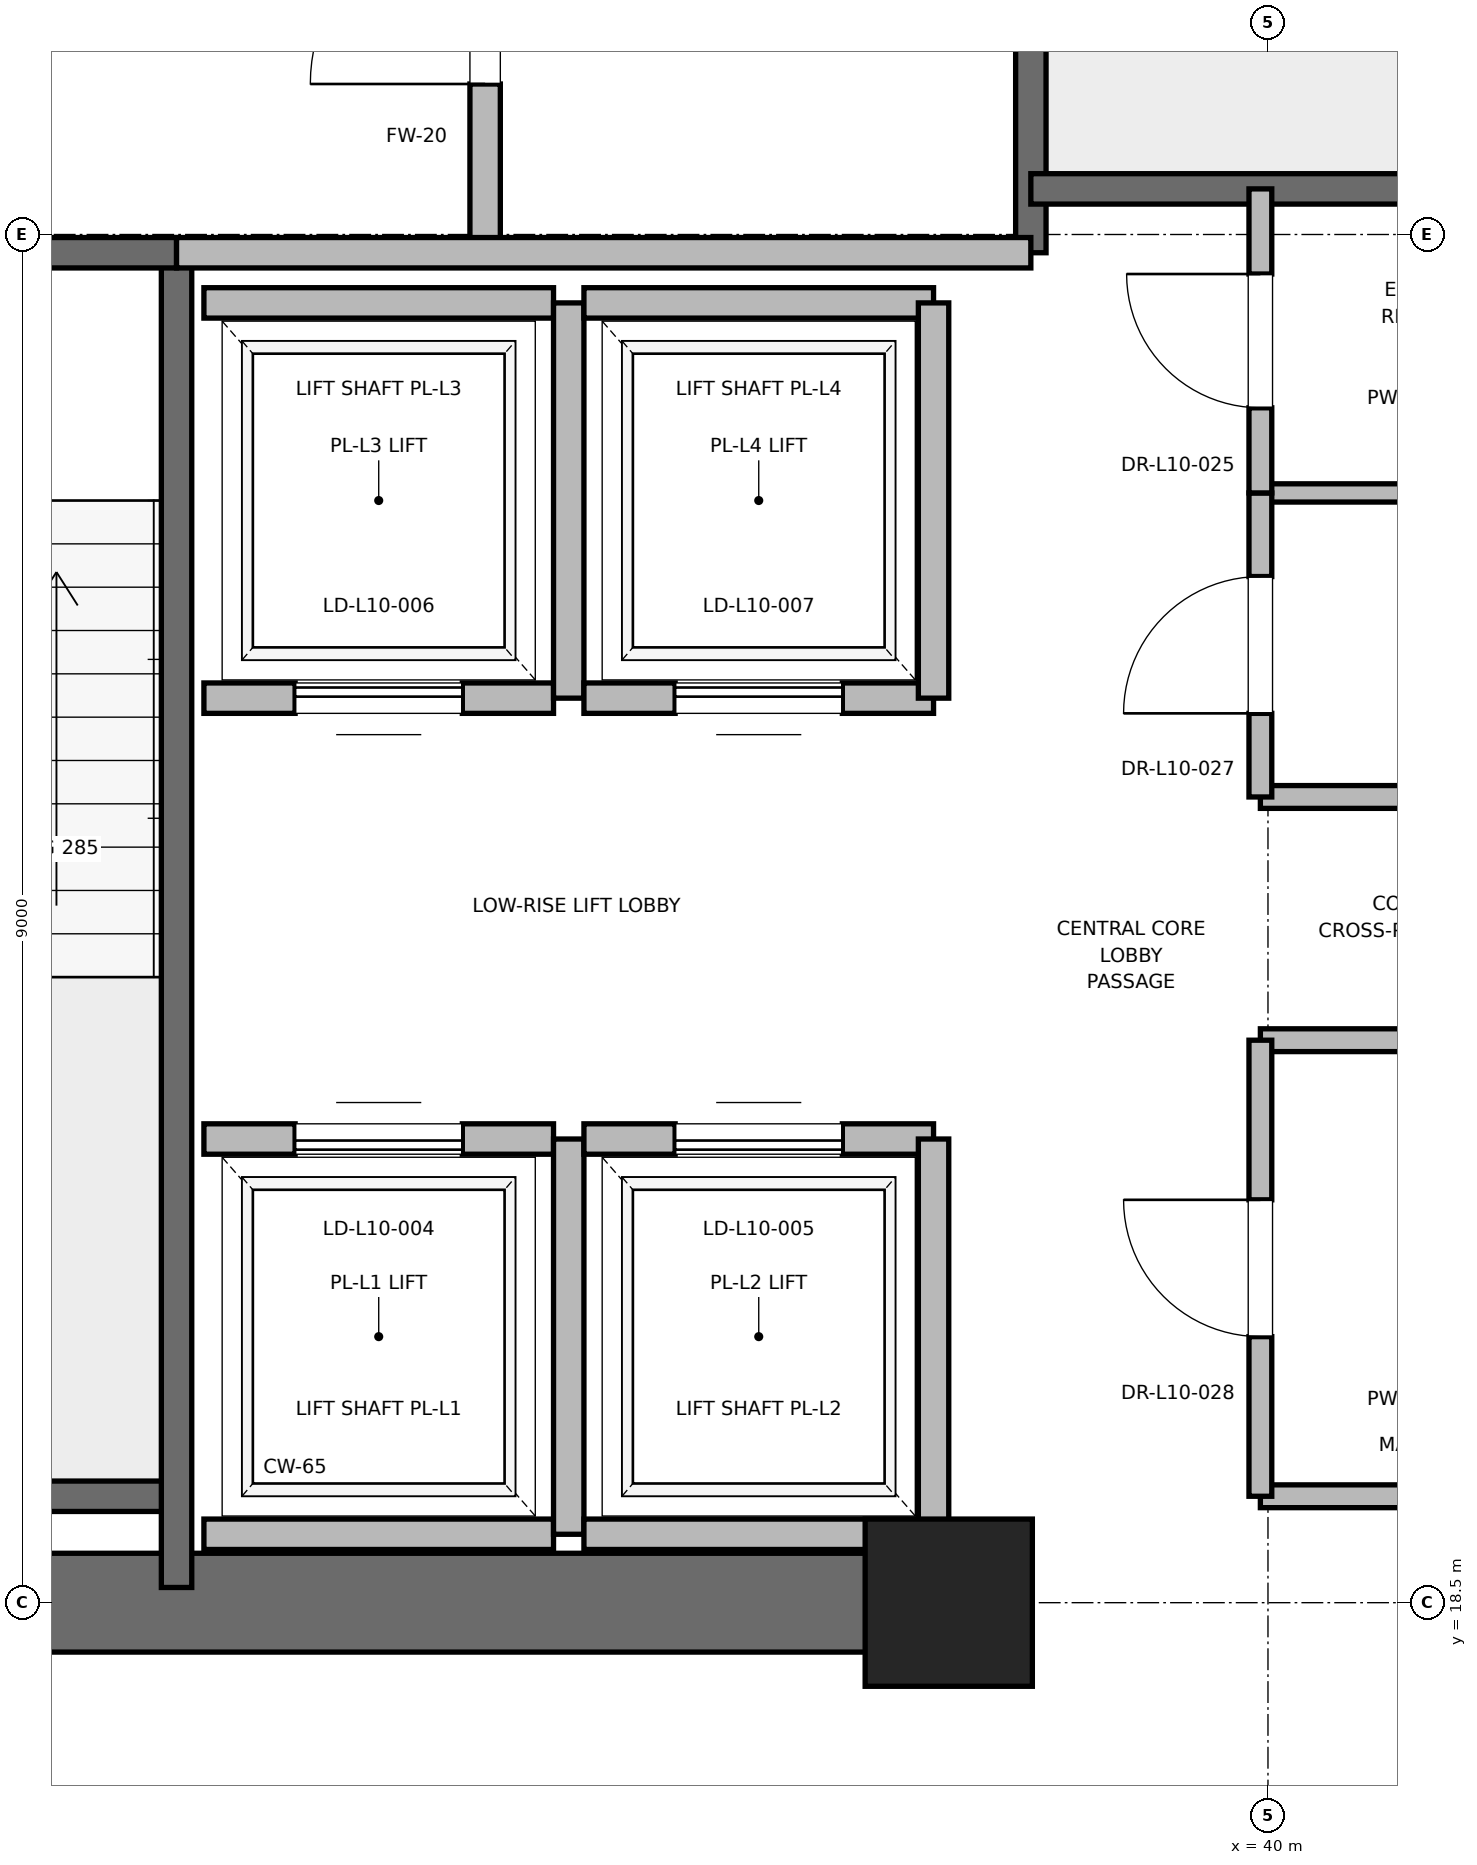
"""IFC4 building model, lengths in metres.
Left out: names, types, materials, properties, quantities, classifications, styles, units other than length and angle.
Written with IfcOpenShell. Run it as: python <this file> out.ifc"""

import sys

from ifc_helpers import new_model, si_unit, direction, frame, frame_2d, origin, origin_2d, place, context, subcontext, project, spatial, rectangle, extrude, element, fill, save


model = new_model("IFC4")
c1 = context("Model", 3, precision=1e-05, world=origin(), true_north=direction((0.0, 1.0)))
c2 = subcontext(c1, "Body", "Model", "MODEL_VIEW")
j1 = project(units=[si_unit("LENGTHUNIT", "METRE"), si_unit("PLANEANGLEUNIT", "RADIAN")], contexts=[c1])
p1 = place(None, origin())
s1 = spatial("IfcSite", under=j1, at=p1, CompositionType="ELEMENT")
p2 = place(p1, origin())
s2 = spatial("IfcBuilding", under=s1, at=p2, CompositionType="ELEMENT")
p3 = place(p2, frame((0.0, 0.0, 47.6)))
s3 = spatial("IfcBuildingStorey", under=s2, at=p3, CompositionType="ELEMENT", Elevation=47.6)
p4 = place(p3, frame((37.9, 18.5, 0.0), z_axis=(0.0, 0.0, 1.0), x_axis=(1.0, 0.0, 0.0)))
e1 = element("IfcColumn", 1, at=p4, inside=s3, PredefinedType="PILASTER", context=c2, shape_type="SweptSolid", body=[
    extrude(rectangle(XDim=1.1, YDim=1.1, at=origin_2d()), origin(), (0.0, 0.0, 1.0), 4.0),
])
p5 = place(p3, frame((29.0, 18.5, 0.0), z_axis=(0.0, 0.0, 1.0), x_axis=(1.0, 0.0, 0.0)))
e2 = element("IfcWall", 2, at=p5, inside=s3, PredefinedType="SHEAR", context=c2, shape_type="SweptSolid", body=[
    extrude(rectangle(XDim=9.2, YDim=0.65, at=frame_2d((4.6, 0.0))), origin(), (0.0, 0.0, 1.0), 3.76),
])
p6 = place(p3, frame((29.7, 19.2, 0.0), z_axis=(0.0, 0.0, 1.0), x_axis=(1.0, 0.0, 0.0)))
e3 = element("IfcWall", 3, at=p6, inside=s3, PredefinedType="SOLIDWALL", context=c2, shape_type="SweptSolid", body=[
    extrude(rectangle(XDim=3.12, YDim=0.2, at=frame_2d((1.56, 0.0))), origin(), (0.0, 0.0, 1.0), 3.76),
])
p7 = place(p3, frame((32.82, 18.6, 0.0), z_axis=(0.0, 0.0, 1.0), x_axis=(0.0, 1.0, 0.0)))
e4 = element("IfcWall", 4, at=p7, inside=s3, PredefinedType="SOLIDWALL", context=c2, shape_type="SweptSolid", body=[
    extrude(rectangle(XDim=8.78, YDim=0.2, at=frame_2d((4.39, 0.0))), origin(), (0.0, 0.0, 1.0), 3.76),
])
p8 = place(p3, frame((29.7, 27.38, 0.0), z_axis=(0.0, 0.0, 1.0), x_axis=(1.0, 0.0, 0.0)))
e5 = element("IfcWall", 5, at=p8, inside=s3, PredefinedType="SOLIDWALL", context=c2, shape_type="SweptSolid", body=[
    extrude(rectangle(XDim=3.12, YDim=0.2, at=frame_2d((1.56, 0.0))), origin(), (0.0, 0.0, 1.0), 3.76),
])
p9 = place(p8, frame((1.01, 0.0, 0.0)))
e6 = element("IfcOpeningElement", 6, at=p9, cuts=e5, PredefinedType="OPENING", context=c2, shape_type="SweptSolid", body=[
    extrude(rectangle(XDim=1.1, YDim=2.15, at=frame_2d((0.55, 1.075))), frame((0.0, 0.1, 0.0), z_axis=(0.0, -1.0, 0.0), x_axis=(1.0, 0.0, 0.0)), (0.0, 0.0, 1.0), 0.2),
])
p10 = place(p3, frame((38.44, 27.38, 0.0), z_axis=(0.0, 0.0, 1.0), x_axis=(0.0, 1.0, 0.0)))
e7 = element("IfcWall", 7, at=p10, inside=s3, PredefinedType="SOLIDWALL", context=c2, shape_type="SweptSolid", body=[
    extrude(rectangle(XDim=8.87, YDim=0.2, at=frame_2d((4.435, 0.0))), origin(), (0.0, 0.0, 1.0), 3.76),
])
p11 = place(p3, frame((38.44, 27.8, 0.0), z_axis=(0.0, 0.0, 1.0), x_axis=(1.0, 0.0, 0.0)))
e8 = element("IfcWall", 8, at=p11, inside=s3, PredefinedType="SOLIDWALL", context=c2, shape_type="SweptSolid", body=[
    extrude(rectangle(XDim=3.32, YDim=0.2, at=frame_2d((1.66, 0.0))), origin(), (0.0, 0.0, 1.0), 3.76),
])
p12 = place(p3, frame((34.85, 27.38, 0.0), z_axis=(0.0, 0.0, 1.0), x_axis=(0.0, 1.0, 0.0)))
e9 = element("IfcWall", 9, at=p12, inside=s3, PredefinedType="PARTITIONING", context=c2, shape_type="SweptSolid", body=[
    extrude(rectangle(XDim=3.37, YDim=0.2, at=frame_2d((1.685, 0.0))), origin(), (0.0, 0.0, 1.0), 3.76),
])
p13 = place(p12, frame((1.11, 0.0, 0.0)))
e10 = element("IfcOpeningElement", 10, at=p13, cuts=e9, PredefinedType="OPENING", context=c2, shape_type="SweptSolid", body=[
    extrude(rectangle(XDim=1.15, YDim=2.2, at=frame_2d((0.575, 1.1))), frame((0.0, 0.1, 0.0), z_axis=(0.0, -1.0, 0.0), x_axis=(1.0, 0.0, 0.0)), (0.0, 0.0, 1.0), 0.2),
])
p14 = place(p3, frame((32.82, 27.38, 0.0), z_axis=(0.0, 0.0, 1.0), x_axis=(1.0, 0.0, 0.0)))
e11 = element("IfcWall", 11, at=p14, inside=s3, PredefinedType="PARTITIONING", context=c2, shape_type="SweptSolid", body=[
    extrude(rectangle(XDim=5.62, YDim=0.2, at=frame_2d((2.81, 0.0))), origin(), (0.0, 0.0, 1.0), 3.76),
])
p15 = place(p3, frame((33.0, 18.95, 0.0), z_axis=(0.0, 0.0, 1.0), x_axis=(1.0, 0.0, 0.0)))
e12 = element("IfcWall", 12, at=p15, inside=s3, PredefinedType="SOLIDWALL", context=c2, shape_type="SweptSolid", body=[
    extrude(rectangle(XDim=2.3, YDim=0.2, at=frame_2d((1.15, 0.0))), origin(), (0.0, 0.0, 1.0), 3.76),
])
p16 = place(p3, frame((35.3, 21.55, 0.0), z_axis=(0.0, 0.0, 1.0), x_axis=(-1.0, 0.0, 0.0)))
e13 = element("IfcWall", 13, at=p16, inside=s3, PredefinedType="SOLIDWALL", context=c2, shape_type="SweptSolid", body=[
    extrude(rectangle(XDim=2.3, YDim=0.2, at=frame_2d((1.15, 0.0))), origin(), (0.0, 0.0, 1.0), 3.76),
])
p17 = place(p16, frame((0.6, 0.0, 0.0)))
e14 = element("IfcOpeningElement", 14, at=p17, cuts=e13, PredefinedType="OPENING", context=c2, shape_type="SweptSolid", body=[
    extrude(rectangle(XDim=1.1, YDim=2.2, at=frame_2d((0.55, 1.1))), frame((0.0, 0.1, 0.0), z_axis=(0.0, -1.0, 0.0), x_axis=(1.0, 0.0, 0.0)), (0.0, 0.0, 1.0), 0.2),
])
p18 = place(p3, frame((35.4, 18.95, 0.0), z_axis=(0.0, 0.0, 1.0), x_axis=(0.0, 1.0, 0.0)))
e15 = element("IfcWall", 15, at=p18, inside=s3, PredefinedType="SOLIDWALL", context=c2, shape_type="SweptSolid", body=[
    extrude(rectangle(XDim=2.6, YDim=0.2, at=frame_2d((1.3, 0.0))), origin(), (0.0, 0.0, 1.0), 3.76),
])
p19 = place(p3, frame((35.5, 18.95, 0.0), z_axis=(0.0, 0.0, 1.0), x_axis=(1.0, 0.0, 0.0)))
e16 = element("IfcWall", 16, at=p19, inside=s3, PredefinedType="SOLIDWALL", context=c2, shape_type="SweptSolid", body=[
    extrude(rectangle(XDim=2.3, YDim=0.2, at=frame_2d((1.15, 0.0))), origin(), (0.0, 0.0, 1.0), 2.54),
])
p20 = place(p3, frame((37.8, 21.55, 0.0), z_axis=(0.0, 0.0, 1.0), x_axis=(-1.0, 0.0, 0.0)))
e17 = element("IfcWall", 17, at=p20, inside=s3, PredefinedType="SOLIDWALL", context=c2, shape_type="SweptSolid", body=[
    extrude(rectangle(XDim=2.3, YDim=0.2, at=frame_2d((1.15, 0.0))), origin(), (0.0, 0.0, 1.0), 3.76),
])
p21 = place(p20, frame((0.6, 0.0, 0.0)))
e18 = element("IfcOpeningElement", 18, at=p21, cuts=e17, PredefinedType="OPENING", context=c2, shape_type="SweptSolid", body=[
    extrude(rectangle(XDim=1.1, YDim=2.2, at=frame_2d((0.55, 1.1))), frame((0.0, 0.1, 0.0), z_axis=(0.0, -1.0, 0.0), x_axis=(1.0, 0.0, 0.0)), (0.0, 0.0, 1.0), 0.2),
])
p22 = place(p3, frame((37.8, 18.95, 0.0), z_axis=(0.0, 0.0, 1.0), x_axis=(0.0, 1.0, 0.0)))
e19 = element("IfcWall", 19, at=p22, inside=s3, PredefinedType="SOLIDWALL", context=c2, shape_type="SweptSolid", body=[
    extrude(rectangle(XDim=2.6, YDim=0.2, at=frame_2d((1.3, 0.0))), origin(), (0.0, 0.0, 1.0), 2.54),
])
p23 = place(p3, frame((33.0, 24.45, 0.0), z_axis=(0.0, 0.0, 1.0), x_axis=(1.0, 0.0, 0.0)))
e20 = element("IfcWall", 20, at=p23, inside=s3, PredefinedType="SOLIDWALL", context=c2, shape_type="SweptSolid", body=[
    extrude(rectangle(XDim=2.3, YDim=0.2, at=frame_2d((1.15, 0.0))), origin(), (0.0, 0.0, 1.0), 3.76),
])
p24 = place(p23, frame((0.6, 0.0, 0.0)))
e21 = element("IfcOpeningElement", 21, at=p24, cuts=e20, PredefinedType="OPENING", context=c2, shape_type="SweptSolid", body=[
    extrude(rectangle(XDim=1.1, YDim=2.2, at=frame_2d((0.55, 1.1))), frame((0.0, 0.1, 0.0), z_axis=(0.0, -1.0, 0.0), x_axis=(1.0, 0.0, 0.0)), (0.0, 0.0, 1.0), 0.2),
])
p25 = place(p3, frame((35.3, 27.05, 0.0), z_axis=(0.0, 0.0, 1.0), x_axis=(-1.0, 0.0, 0.0)))
e22 = element("IfcWall", 22, at=p25, inside=s3, PredefinedType="SOLIDWALL", context=c2, shape_type="SweptSolid", body=[
    extrude(rectangle(XDim=2.3, YDim=0.2, at=frame_2d((1.15, 0.0))), origin(), (0.0, 0.0, 1.0), 3.76),
])
p26 = place(p3, frame((35.4, 24.45, 0.0), z_axis=(0.0, 0.0, 1.0), x_axis=(0.0, 1.0, 0.0)))
e23 = element("IfcWall", 23, at=p26, inside=s3, PredefinedType="SOLIDWALL", context=c2, shape_type="SweptSolid", body=[
    extrude(rectangle(XDim=2.6, YDim=0.2, at=frame_2d((1.3, 0.0))), origin(), (0.0, 0.0, 1.0), 3.76),
])
p27 = place(p3, frame((35.5, 24.45, 0.0), z_axis=(0.0, 0.0, 1.0), x_axis=(1.0, 0.0, 0.0)))
e24 = element("IfcWall", 24, at=p27, inside=s3, PredefinedType="SOLIDWALL", context=c2, shape_type="SweptSolid", body=[
    extrude(rectangle(XDim=2.3, YDim=0.2, at=frame_2d((1.15, 0.0))), origin(), (0.0, 0.0, 1.0), 3.76),
])
p28 = place(p27, frame((0.6, 0.0, 0.0)))
e25 = element("IfcOpeningElement", 25, at=p28, cuts=e24, PredefinedType="OPENING", context=c2, shape_type="SweptSolid", body=[
    extrude(rectangle(XDim=1.1, YDim=2.2, at=frame_2d((0.55, 1.1))), frame((0.0, 0.1, 0.0), z_axis=(0.0, -1.0, 0.0), x_axis=(1.0, 0.0, 0.0)), (0.0, 0.0, 1.0), 0.2),
])
p29 = place(p3, frame((37.8, 27.05, 0.0), z_axis=(0.0, 0.0, 1.0), x_axis=(-1.0, 0.0, 0.0)))
e26 = element("IfcWall", 26, at=p29, inside=s3, PredefinedType="SOLIDWALL", context=c2, shape_type="SweptSolid", body=[
    extrude(rectangle(XDim=2.3, YDim=0.2, at=frame_2d((1.15, 0.0))), origin(), (0.0, 0.0, 1.0), 3.76),
])
p30 = place(p3, frame((37.8, 24.45, 0.0), z_axis=(0.0, 0.0, 1.0), x_axis=(0.0, 1.0, 0.0)))
e27 = element("IfcWall", 27, at=p30, inside=s3, PredefinedType="SOLIDWALL", context=c2, shape_type="SweptSolid", body=[
    extrude(rectangle(XDim=2.6, YDim=0.2, at=frame_2d((1.3, 0.0))), origin(), (0.0, 0.0, 1.0), 3.76),
])
for number, where, z_axis, x_axis in (
    (28, (39.95, 19.2, 0.0), (0.0, 0.0, 1.0), (1.0, 0.0, 0.0)),
    (29, (39.95, 22.2, 0.0), (0.0, 0.0, 1.0), (1.0, 0.0, 0.0)),
    (30, (39.95, 23.8, 0.0), (0.0, 0.0, 1.0), (1.0, 0.0, 0.0)),
):
    element("IfcWall", number, at=place(p3, frame(where, z_axis=z_axis, x_axis=x_axis)), inside=s3, PredefinedType="PARTITIONING", context=c2, shape_type="SweptSolid", body=[
        extrude(rectangle(XDim=1.81, YDim=0.15, at=frame_2d((0.905, 0.0))), origin(), (0.0, 0.0, 1.0), 2.85),
    ])
p31 = place(p3, frame((39.95, 25.8, 0.0), z_axis=(0.0, 0.0, 1.0), x_axis=(1.0, 0.0, 0.0)))
e31 = element("IfcWall", 31, at=p31, inside=s3, PredefinedType="PARTITIONING", context=c2, shape_type="SweptSolid", body=[
    extrude(rectangle(XDim=1.81, YDim=0.12, at=frame_2d((0.905, 0.0))), origin(), (0.0, 0.0, 1.0), 2.85),
])
p32 = place(p3, frame((39.95, 19.2, 0.0), z_axis=(0.0, 0.0, 1.0), x_axis=(0.0, 1.0, 0.0)))
e32 = element("IfcWall", 32, at=p32, inside=s3, PredefinedType="PARTITIONING", context=c2, shape_type="SweptSolid", body=[
    extrude(rectangle(XDim=3.0, YDim=0.15, at=frame_2d((1.5, 0.0))), origin(), (0.0, 0.0, 1.0), 2.85),
])
p33 = place(p32, frame((1.05, 0.0, 0.0)))
e33 = element("IfcOpeningElement", 33, at=p33, cuts=e32, PredefinedType="OPENING", context=c2, shape_type="SweptSolid", body=[
    extrude(rectangle(XDim=0.9, YDim=2.1, at=frame_2d((0.45, 1.05))), frame((0.0, 0.075, 0.0), z_axis=(0.0, -1.0, 0.0), x_axis=(1.0, 0.0, 0.0)), (0.0, 0.0, 1.0), 0.15),
])
p34 = place(p3, frame((39.95, 23.8, 0.0), z_axis=(0.0, 0.0, 1.0), x_axis=(0.0, 1.0, 0.0)))
e34 = element("IfcWall", 34, at=p34, inside=s3, PredefinedType="PARTITIONING", context=c2, shape_type="SweptSolid", body=[
    extrude(rectangle(XDim=2.0, YDim=0.15, at=frame_2d((1.0, 0.0))), origin(), (0.0, 0.0, 1.0), 2.85),
])
p35 = place(p34, frame((0.55, 0.0, 0.0)))
e35 = element("IfcOpeningElement", 35, at=p35, cuts=e34, PredefinedType="OPENING", context=c2, shape_type="SweptSolid", body=[
    extrude(rectangle(XDim=0.9, YDim=2.1, at=frame_2d((0.45, 1.05))), frame((0.0, 0.075, 0.0), z_axis=(0.0, -1.0, 0.0), x_axis=(1.0, 0.0, 0.0)), (0.0, 0.0, 1.0), 0.15),
])
p36 = place(p3, frame((39.95, 25.8, 0.0), z_axis=(0.0, 0.0, 1.0), x_axis=(0.0, 1.0, 0.0)))
e36 = element("IfcWall", 36, at=p36, inside=s3, PredefinedType="PARTITIONING", context=c2, shape_type="SweptSolid", body=[
    extrude(rectangle(XDim=2.0, YDim=0.15, at=frame_2d((1.0, 0.0))), origin(), (0.0, 0.0, 1.0), 2.85),
])
p37 = place(p36, frame((0.56, 0.0, 0.0)))
e37 = element("IfcOpeningElement", 37, at=p37, cuts=e36, PredefinedType="OPENING", context=c2, shape_type="SweptSolid", body=[
    extrude(rectangle(XDim=0.88, YDim=2.1, at=frame_2d((0.44, 1.05))), frame((0.0, 0.075, 0.0), z_axis=(0.0, -1.0, 0.0), x_axis=(1.0, 0.0, 0.0)), (0.0, 0.0, 1.0), 0.15),
])
p38 = place(p13, origin())
e38 = element("IfcDoor", 38, at=p38, inside=s3, OperationType="SINGLE_SWING_LEFT", PredefinedType="DOOR", context=c2, shape_type="SweptSolid", body=[
    extrude(rectangle(XDim=1.15, YDim=2.2, at=frame_2d((0.575, 1.1))), frame((0.0, 0.025, 0.0), z_axis=(0.0, -1.0, 0.0), x_axis=(1.0, 0.0, 0.0)), (0.0, 0.0, 1.0), 0.05),
])
fill(e10, e38)
p39 = place(p17, origin())
e39 = element("IfcDoor", 39, at=p39, inside=s3, OperationType="SLIDING_TO_RIGHT", PredefinedType="DOOR", context=c2, shape_type="SweptSolid", body=[
    extrude(rectangle(XDim=1.1, YDim=2.2, at=frame_2d((0.55, 1.1))), frame((0.0, 0.025, 0.0), z_axis=(0.0, -1.0, 0.0), x_axis=(1.0, 0.0, 0.0)), (0.0, 0.0, 1.0), 0.05),
])
fill(e14, e39)
p40 = place(p21, origin())
e40 = element("IfcDoor", 40, at=p40, inside=s3, OperationType="SLIDING_TO_RIGHT", PredefinedType="DOOR", context=c2, shape_type="SweptSolid", body=[
    extrude(rectangle(XDim=1.1, YDim=2.2, at=frame_2d((0.55, 1.1))), frame((0.0, 0.025, 0.0), z_axis=(0.0, -1.0, 0.0), x_axis=(1.0, 0.0, 0.0)), (0.0, 0.0, 1.0), 0.05),
])
fill(e18, e40)
p41 = place(p24, origin())
e41 = element("IfcDoor", 41, at=p41, inside=s3, OperationType="SLIDING_TO_RIGHT", PredefinedType="DOOR", context=c2, shape_type="SweptSolid", body=[
    extrude(rectangle(XDim=1.1, YDim=2.2, at=frame_2d((0.55, 1.1))), frame((0.0, 0.025, 0.0), z_axis=(0.0, -1.0, 0.0), x_axis=(1.0, 0.0, 0.0)), (0.0, 0.0, 1.0), 0.05),
])
fill(e21, e41)
p42 = place(p28, origin())
e42 = element("IfcDoor", 42, at=p42, inside=s3, OperationType="SLIDING_TO_RIGHT", PredefinedType="DOOR", context=c2, shape_type="SweptSolid", body=[
    extrude(rectangle(XDim=1.1, YDim=2.2, at=frame_2d((0.55, 1.1))), frame((0.0, 0.025, 0.0), z_axis=(0.0, -1.0, 0.0), x_axis=(1.0, 0.0, 0.0)), (0.0, 0.0, 1.0), 0.05),
])
fill(e25, e42)
p43 = place(p33, origin())
e43 = element("IfcDoor", 43, at=p43, inside=s3, OperationType="SINGLE_SWING_RIGHT", PredefinedType="DOOR", context=c2, shape_type="SweptSolid", body=[
    extrude(rectangle(XDim=0.9, YDim=2.1, at=frame_2d((0.45, 1.05))), frame((0.0, 0.025, 0.0), z_axis=(0.0, -1.0, 0.0), x_axis=(1.0, 0.0, 0.0)), (0.0, 0.0, 1.0), 0.05),
])
fill(e33, e43)
p44 = place(p35, origin())
e44 = element("IfcDoor", 44, at=p44, inside=s3, OperationType="SINGLE_SWING_LEFT", PredefinedType="DOOR", context=c2, shape_type="SweptSolid", body=[
    extrude(rectangle(XDim=0.9, YDim=2.1, at=frame_2d((0.45, 1.05))), frame((0.0, 0.025, 0.0), z_axis=(0.0, -1.0, 0.0), x_axis=(1.0, 0.0, 0.0)), (0.0, 0.0, 1.0), 0.05),
])
fill(e35, e44)
p45 = place(p37, origin())
e45 = element("IfcDoor", 45, at=p45, inside=s3, OperationType="SINGLE_SWING_RIGHT", PredefinedType="DOOR", context=c2, shape_type="SweptSolid", body=[
    extrude(rectangle(XDim=0.88, YDim=2.1, at=frame_2d((0.44, 1.05))), frame((0.0, 0.025, 0.0), z_axis=(0.0, -1.0, 0.0), x_axis=(1.0, 0.0, 0.0)), (0.0, 0.0, 1.0), 0.05),
])
fill(e37, e45)
save(model, sys.argv[1])
